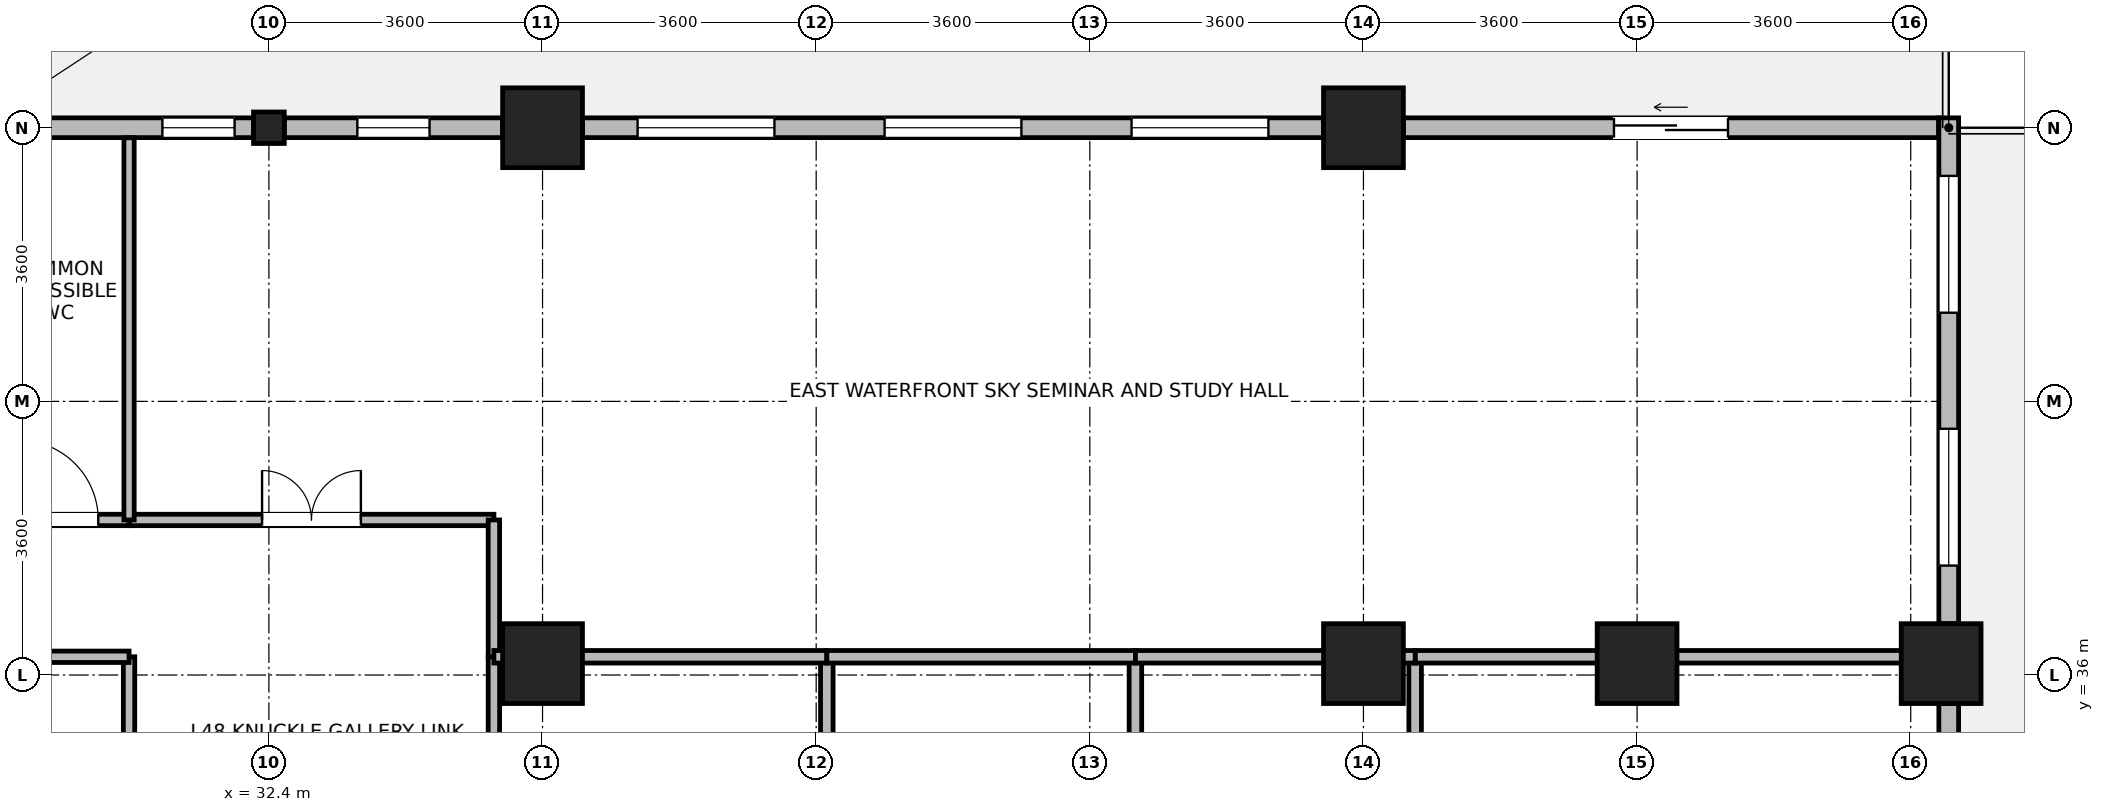
"""IFC4 building model, lengths in metres.
Left out: names, types, materials, properties, quantities, classifications, styles, units other than length and angle.
Written with IfcOpenShell. Run it as: python <this file> out.ifc"""

import sys

from ifc_helpers import new_model, si_unit, direction, frame, frame_2d, origin, origin_2d, place, context, subcontext, project, spatial, rectangle, i_section, extrude, source, transform, mapped, element, fill, save


model = new_model("IFC4")
c1 = context("Model", 3, precision=1e-05, world=origin(), true_north=direction((0.0, 1.0)))
c2 = subcontext(c1, "Body", "Model", "MODEL_VIEW")
j1 = project(units=[si_unit("LENGTHUNIT", "METRE"), si_unit("PLANEANGLEUNIT", "RADIAN")], contexts=[c1])
p1 = place(None, origin())
s1 = spatial("IfcSite", under=j1, at=p1, CompositionType="ELEMENT")
p2 = place(p1, origin())
s2 = spatial("IfcBuilding", under=s1, at=p2, CompositionType="ELEMENT")
p3 = place(p2, frame((0.0, 0.0, 188.3)))
s3 = spatial("IfcBuildingStorey", under=s2, at=p3, CompositionType="ELEMENT", Elevation=188.3)
m1 = source(origin(), c2, "Body", "SweptSolid", [
    extrude(rectangle(XDim=1.05, YDim=1.05, at=origin_2d()), origin(), (0.0, 0.0, 1.0), 3.7),
])
for number, where, z_axis, x_axis in (
    (1, (36.0, 43.2, 0.0), (0.0, 0.0, 1.0), (1.0, 0.0, 0.0)),
    (2, (36.0, 36.15, 0.0), (0.0, 0.0, 1.0), (1.0, 0.0, 0.0)),
    (3, (46.8, 36.15, 0.0), (0.0, 0.0, 1.0), (1.0, 0.0, 0.0)),
    (4, (46.8, 43.2, 0.0), (0.0, 0.0, 1.0), (1.0, 0.0, 0.0)),
    (5, (50.4, 36.15, 0.0), (0.0, 0.0, 1.0), (1.0, 0.0, 0.0)),
    (6, (54.4, 36.15, 0.0), (0.0, 0.0, 1.0), (1.0, 0.0, 0.0)),
):
    element("IfcColumn", number, at=place(p3, frame(where, z_axis=z_axis, x_axis=x_axis)), inside=s3, PredefinedType="COLUMN", context=c2, shape_type="MappedRepresentation", body=[
        mapped(m1, transform((0.0, 0.0, 0.0), x_axis=(1.0, 0.0, 0.0), y_axis=(0.0, 1.0, 0.0), z_axis=(0.0, 0.0, 1.0), scale=1.0)),
    ])
m2 = source(origin(), c2, "Body", "SweptSolid", [
    extrude(i_section(OverallWidth=0.404, OverallDepth=0.414, WebThickness=0.021, FlangeThickness=0.028, FilletRadius=0.015, at=origin_2d()), origin(), (0.0, 0.0, 1.0), 3.7),
])
p4 = place(p3, frame((32.4, 43.2, 0.0), z_axis=(0.0, 0.0, 1.0), x_axis=(1.0, 0.0, 0.0)))
e7 = element("IfcColumn", 7, at=p4, inside=s3, PredefinedType="COLUMN", context=c2, shape_type="MappedRepresentation", body=[
    mapped(m2, transform((0.0, 0.0, 0.0), x_axis=(1.0, 0.0, 0.0), y_axis=(0.0, 1.0, 0.0), z_axis=(0.0, 0.0, 1.0), scale=1.0)),
])
p5 = place(p3, frame((54.5, 35.624, 0.0), z_axis=(0.0, 0.0, 1.0), x_axis=(0.0, -1.0, 0.0)))
e8 = element("IfcWall", 8, at=p5, inside=s3, PredefinedType="STANDARD", context=c2, shape_type="SweptSolid", body=[
    extrude(rectangle(XDim=6.448, YDim=0.26, at=frame_2d((3.224, 0.0))), origin(), (0.0, 0.0, 1.0), 2.87),
])
p6 = place(p5, frame((0.712, 0.0, 0.85)))
e9 = element("IfcOpeningElement", 9, at=p6, cuts=e8, PredefinedType="OPENING", context=c2, shape_type="SweptSolid", body=[
    extrude(rectangle(XDim=1.8, YDim=1.85, at=frame_2d((0.9, 0.925))), frame((0.0, 0.14, 0.0), z_axis=(0.0, -1.0, 0.0), x_axis=(1.0, 0.0, 0.0)), (0.0, 0.0, 1.0), 0.28),
])
p7 = place(p5, frame((3.936, 0.0, 0.85)))
e10 = element("IfcOpeningElement", 10, at=p7, cuts=e8, PredefinedType="OPENING", context=c2, shape_type="SweptSolid", body=[
    extrude(rectangle(XDim=1.8, YDim=1.85, at=frame_2d((0.9, 0.925))), frame((0.0, 0.14, 0.0), z_axis=(0.0, -1.0, 0.0), x_axis=(1.0, 0.0, 0.0)), (0.0, 0.0, 1.0), 0.28),
])
p8 = place(p3, frame((54.5, 43.33, 0.0), z_axis=(0.0, 0.0, 1.0), x_axis=(0.0, -1.0, 0.0)))
e11 = element("IfcWall", 11, at=p8, inside=s3, PredefinedType="STANDARD", context=c2, shape_type="SweptSolid", body=[
    extrude(rectangle(XDim=6.654, YDim=0.26, at=frame_2d((3.327, 0.0))), origin(), (0.0, 0.0, 1.0), 3.32),
])
p9 = place(p8, frame((0.763, 0.0, 0.85)))
e12 = element("IfcOpeningElement", 12, at=p9, cuts=e11, PredefinedType="OPENING", context=c2, shape_type="SweptSolid", body=[
    extrude(rectangle(XDim=1.8, YDim=1.85, at=frame_2d((0.9, 0.925))), frame((0.0, 0.14, 0.0), z_axis=(0.0, -1.0, 0.0), x_axis=(1.0, 0.0, 0.0)), (0.0, 0.0, 1.0), 0.28),
])
p10 = place(p8, frame((4.091, 0.0, 0.85)))
e13 = element("IfcOpeningElement", 13, at=p10, cuts=e11, PredefinedType="OPENING", context=c2, shape_type="SweptSolid", body=[
    extrude(rectangle(XDim=1.8, YDim=1.85, at=frame_2d((0.9, 0.925))), frame((0.0, 0.14, 0.0), z_axis=(0.0, -1.0, 0.0), x_axis=(1.0, 0.0, 0.0)), (0.0, 0.0, 1.0), 0.28),
])
p11 = place(p3, frame((47.326, 43.2, 0.0), z_axis=(0.0, 0.0, 1.0), x_axis=(1.0, 0.0, 0.0)))
e14 = element("IfcWall", 14, at=p11, inside=s3, PredefinedType="STANDARD", context=c2, shape_type="SweptSolid", body=[
    extrude(rectangle(XDim=7.039, YDim=0.26, at=frame_2d((3.52, 0.0))), origin(), (0.0, 0.0, 1.0), 3.32),
])
p12 = place(p11, frame((2.77, 0.0, 0.0)))
e15 = element("IfcOpeningElement", 15, at=p12, cuts=e14, PredefinedType="OPENING", context=c2, shape_type="SweptSolid", body=[
    extrude(rectangle(XDim=1.5, YDim=2.15, at=frame_2d((0.75, 1.075))), frame((0.0, 0.14, 0.0), z_axis=(0.0, -1.0, 0.0), x_axis=(1.0, 0.0, 0.0)), (0.0, 0.0, 1.0), 0.28),
])
p13 = place(p3, frame((36.526, 43.2, 0.0), z_axis=(0.0, 0.0, 1.0), x_axis=(1.0, 0.0, 0.0)))
e16 = element("IfcWall", 16, at=p13, inside=s3, PredefinedType="STANDARD", context=c2, shape_type="SweptSolid", body=[
    extrude(rectangle(XDim=9.748, YDim=0.26, at=frame_2d((4.874, 0.0))), origin(), (0.0, 0.0, 1.0), 2.87),
])
p14 = place(p13, frame((0.725, 0.0, 0.85)))
e17 = element("IfcOpeningElement", 17, at=p14, cuts=e16, PredefinedType="OPENING", context=c2, shape_type="SweptSolid", body=[
    extrude(rectangle(XDim=1.8, YDim=1.85, at=frame_2d((0.9, 0.925))), frame((0.0, 0.14, 0.0), z_axis=(0.0, -1.0, 0.0), x_axis=(1.0, 0.0, 0.0)), (0.0, 0.0, 1.0), 0.28),
])
p15 = place(p13, frame((3.974, 0.0, 0.85)))
e18 = element("IfcOpeningElement", 18, at=p15, cuts=e16, PredefinedType="OPENING", context=c2, shape_type="SweptSolid", body=[
    extrude(rectangle(XDim=1.8, YDim=1.85, at=frame_2d((0.9, 0.925))), frame((0.0, 0.14, 0.0), z_axis=(0.0, -1.0, 0.0), x_axis=(1.0, 0.0, 0.0)), (0.0, 0.0, 1.0), 0.28),
])
p16 = place(p13, frame((7.223, 0.0, 0.85)))
e19 = element("IfcOpeningElement", 19, at=p16, cuts=e16, PredefinedType="OPENING", context=c2, shape_type="SweptSolid", body=[
    extrude(rectangle(XDim=1.8, YDim=1.85, at=frame_2d((0.9, 0.925))), frame((0.0, 0.14, 0.0), z_axis=(0.0, -1.0, 0.0), x_axis=(1.0, 0.0, 0.0)), (0.0, 0.0, 1.0), 0.28),
])
p17 = place(p3, frame((32.603, 43.2, 0.0), z_axis=(0.0, 0.0, 1.0), x_axis=(1.0, 0.0, 0.0)))
e20 = element("IfcWall", 20, at=p17, inside=s3, PredefinedType="STANDARD", context=c2, shape_type="SweptSolid", body=[
    extrude(rectangle(XDim=2.871, YDim=0.26, at=frame_2d((1.436, 0.0))), origin(), (0.0, 0.0, 1.0), 2.87),
])
p18 = place(p17, frame((0.96, 0.0, 0.85)))
e21 = element("IfcOpeningElement", 21, at=p18, cuts=e20, PredefinedType="OPENING", context=c2, shape_type="SweptSolid", body=[
    extrude(rectangle(XDim=0.95, YDim=1.75, at=frame_2d((0.475, 0.875))), frame((0.0, 0.14, 0.0), z_axis=(0.0, -1.0, 0.0), x_axis=(1.0, 0.0, 0.0)), (0.0, 0.0, 1.0), 0.28),
])
p19 = place(p3, frame((29.326, 43.2, 0.0), z_axis=(0.0, 0.0, 1.0), x_axis=(1.0, 0.0, 0.0)))
e22 = element("IfcWall", 22, at=p19, inside=s3, PredefinedType="STANDARD", context=c2, shape_type="SweptSolid", body=[
    extrude(rectangle(XDim=2.871, YDim=0.26, at=frame_2d((1.436, 0.0))), origin(), (0.0, 0.0, 1.0), 2.87),
])
p20 = place(p19, frame((1.673, 0.0, 0.85)))
e23 = element("IfcOpeningElement", 23, at=p20, cuts=e22, PredefinedType="OPENING", context=c2, shape_type="SweptSolid", body=[
    extrude(rectangle(XDim=0.95, YDim=1.75, at=frame_2d((0.475, 0.875))), frame((0.0, 0.14, 0.0), z_axis=(0.0, -1.0, 0.0), x_axis=(1.0, 0.0, 0.0)), (0.0, 0.0, 1.0), 0.28),
])
p21 = place(p3, frame((35.36, 28.56, 0.0), z_axis=(0.0, 0.0, 1.0), x_axis=(0.0, 1.0, 0.0)))
e24 = element("IfcWall", 24, at=p21, inside=s3, PredefinedType="PARTITIONING", context=c2, shape_type="SweptSolid", body=[
    extrude(rectangle(XDim=7.68, YDim=0.15, at=frame_2d((3.84, 0.0))), origin(), (0.0, 0.0, 1.0), 3.32),
])
p22 = place(p21, frame((3.19, 0.0, 0.0)))
e25 = element("IfcOpeningElement", 25, at=p22, cuts=e24, PredefinedType="OPENING", context=c2, shape_type="SweptSolid", body=[
    extrude(rectangle(XDim=1.3, YDim=2.12, at=frame_2d((0.65, 1.06))), frame((0.0, 0.085, 0.0), z_axis=(0.0, -1.0, 0.0), x_axis=(1.0, 0.0, 0.0)), (0.0, 0.0, 1.0), 0.17),
])
p23 = place(p3, frame((30.56, 38.04, 0.0), z_axis=(0.0, 0.0, 1.0), x_axis=(1.0, 0.0, 0.0)))
e26 = element("IfcWall", 26, at=p23, inside=s3, PredefinedType="PARTITIONING", context=c2, shape_type="SweptSolid", body=[
    extrude(rectangle(XDim=4.8, YDim=0.15, at=frame_2d((2.4, 0.0))), origin(), (0.0, 0.0, 1.0), 3.32),
])
p24 = place(p23, frame((1.75, 0.0, 0.0)))
e27 = element("IfcOpeningElement", 27, at=p24, cuts=e26, PredefinedType="OPENING", context=c2, shape_type="SweptSolid", body=[
    extrude(rectangle(XDim=1.3, YDim=2.12, at=frame_2d((0.65, 1.06))), frame((0.0, 0.085, 0.0), z_axis=(0.0, -1.0, 0.0), x_axis=(1.0, 0.0, 0.0)), (0.0, 0.0, 1.0), 0.17),
])
p25 = place(p3, frame((30.56, 31.64, 0.0), z_axis=(0.0, 0.0, 1.0), x_axis=(0.0, 1.0, 0.0)))
e28 = element("IfcWall", 28, at=p25, inside=s3, PredefinedType="PARTITIONING", context=c2, shape_type="SweptSolid", body=[
    extrude(rectangle(XDim=4.6, YDim=0.15, at=frame_2d((2.3, 0.0))), origin(), (0.0, 0.0, 1.0), 3.32),
])
p26 = place(p25, frame((1.65, 0.0, 0.0)))
e29 = element("IfcOpeningElement", 29, at=p26, cuts=e28, PredefinedType="OPENING", context=c2, shape_type="SweptSolid", body=[
    extrude(rectangle(XDim=1.3, YDim=2.12, at=frame_2d((0.65, 1.06))), frame((0.0, 0.085, 0.0), z_axis=(0.0, -1.0, 0.0), x_axis=(1.0, 0.0, 0.0)), (0.0, 0.0, 1.0), 0.17),
])
p27 = place(p3, frame((28.7, 38.04, 0.0), z_axis=(0.0, 0.0, 1.0), x_axis=(1.0, 0.0, 0.0)))
e30 = element("IfcWall", 30, at=p27, inside=s3, PredefinedType="PARTITIONING", context=c2, shape_type="SweptSolid", body=[
    extrude(rectangle(XDim=1.86, YDim=0.15, at=frame_2d((0.93, 0.0))), origin(), (0.0, 0.0, 1.0), 3.32),
])
p28 = place(p27, frame((0.405, 0.0, 0.0)))
e31 = element("IfcOpeningElement", 31, at=p28, cuts=e30, PredefinedType="OPENING", context=c2, shape_type="SweptSolid", body=[
    extrude(rectangle(XDim=1.05, YDim=2.12, at=frame_2d((0.525, 1.06))), frame((0.0, 0.085, 0.0), z_axis=(0.0, -1.0, 0.0), x_axis=(1.0, 0.0, 0.0)), (0.0, 0.0, 1.0), 0.17),
])
p29 = place(p3, frame((35.36, 36.24, 0.0), z_axis=(0.0, 0.0, 1.0), x_axis=(0.0, 1.0, 0.0)))
e32 = element("IfcWall", 32, at=p29, inside=s3, PredefinedType="PARTITIONING", context=c2, shape_type="SweptSolid", body=[
    extrude(rectangle(XDim=1.8, YDim=0.15, at=frame_2d((0.9, 0.0))), origin(), (0.0, 0.0, 1.0), 3.32),
])
p30 = place(p3, frame((29.325, 36.24, 0.0), z_axis=(0.0, 0.0, 1.0), x_axis=(1.0, 0.0, 0.0)))
e33 = element("IfcWall", 33, at=p30, inside=s3, PredefinedType="PARTITIONING", context=c2, shape_type="SweptSolid", body=[
    extrude(rectangle(XDim=1.235, YDim=0.15, at=frame_2d((0.618, 0.0))), origin(), (0.0, 0.0, 1.0), 2.72),
])
for number, where, z_axis, x_axis in (
    (34, (39.74, 28.56, 0.0), (0.0, 0.0, 1.0), (0.0, 1.0, 0.0)),
    (35, (43.8, 28.56, 0.0), (0.0, 0.0, 1.0), (0.0, 1.0, 0.0)),
    (36, (47.48, 28.56, 0.0), (0.0, 0.0, 1.0), (0.0, 1.0, 0.0)),
):
    element("IfcWall", number, at=place(p3, frame(where, z_axis=z_axis, x_axis=x_axis)), inside=s3, PredefinedType="PARTITIONING", context=c2, shape_type="SweptSolid", body=[
        extrude(rectangle(XDim=7.68, YDim=0.165, at=frame_2d((3.84, 0.0))), origin(), (0.0, 0.0, 1.0), 3.32),
    ])
p31 = place(p3, frame((47.48, 36.24, 0.0), z_axis=(0.0, 0.0, 1.0), x_axis=(1.0, 0.0, 0.0)))
e37 = element("IfcWall", 37, at=p31, inside=s3, PredefinedType="PARTITIONING", context=c2, shape_type="SweptSolid", body=[
    extrude(rectangle(XDim=6.888, YDim=0.165, at=frame_2d((3.444, 0.0))), origin(), (0.0, 0.0, 1.0), 2.72),
])
p32 = place(p3, frame((30.56, 38.04, 0.0), z_axis=(0.0, 0.0, 1.0), x_axis=(0.0, 1.0, 0.0)))
e38 = element("IfcWall", 38, at=p32, inside=s3, PredefinedType="PARTITIONING", context=c2, shape_type="SweptSolid", body=[
    extrude(rectangle(XDim=5.028, YDim=0.135, at=frame_2d((2.514, 0.0))), origin(), (0.0, 0.0, 1.0), 3.32),
])
p33 = place(p3, frame((35.36, 36.24, 0.0), z_axis=(0.0, 0.0, 1.0), x_axis=(1.0, 0.0, 0.0)))
e39 = element("IfcWall", 39, at=p33, inside=s3, PredefinedType="PARTITIONING", context=c2, shape_type="SweptSolid", body=[
    extrude(rectangle(XDim=4.38, YDim=0.165, at=frame_2d((2.19, 0.0))), origin(), (0.0, 0.0, 1.0), 2.72),
])
p34 = place(p3, frame((39.74, 36.24, 0.0), z_axis=(0.0, 0.0, 1.0), x_axis=(1.0, 0.0, 0.0)))
e40 = element("IfcWall", 40, at=p34, inside=s3, PredefinedType="PARTITIONING", context=c2, shape_type="SweptSolid", body=[
    extrude(rectangle(XDim=4.06, YDim=0.165, at=frame_2d((2.03, 0.0))), origin(), (0.0, 0.0, 1.0), 2.72),
])
p35 = place(p3, frame((43.8, 36.24, 0.0), z_axis=(0.0, 0.0, 1.0), x_axis=(1.0, 0.0, 0.0)))
e41 = element("IfcWall", 41, at=p35, inside=s3, PredefinedType="PARTITIONING", context=c2, shape_type="SweptSolid", body=[
    extrude(rectangle(XDim=3.68, YDim=0.165, at=frame_2d((1.84, 0.0))), origin(), (0.0, 0.0, 1.0), 2.72),
])
p36 = place(p9, origin())
e42 = element("IfcWindow", 42, at=p36, inside=s3, PartitioningType="SINGLE_PANEL", PredefinedType="WINDOW", context=c2, shape_type="SweptSolid", body=[
    extrude(rectangle(XDim=1.8, YDim=1.85, at=frame_2d((0.9, 0.925))), frame((0.0, 0.03, 0.0), z_axis=(0.0, -1.0, 0.0), x_axis=(1.0, 0.0, 0.0)), (0.0, 0.0, 1.0), 0.06),
])
fill(e12, e42)
p37 = place(p10, origin())
e43 = element("IfcWindow", 43, at=p37, inside=s3, PartitioningType="SINGLE_PANEL", PredefinedType="WINDOW", context=c2, shape_type="SweptSolid", body=[
    extrude(rectangle(XDim=1.8, YDim=1.85, at=frame_2d((0.9, 0.925))), frame((0.0, 0.03, 0.0), z_axis=(0.0, -1.0, 0.0), x_axis=(1.0, 0.0, 0.0)), (0.0, 0.0, 1.0), 0.06),
])
fill(e13, e43)
p38 = place(p12, origin())
e44 = element("IfcDoor", 44, at=p38, inside=s3, OperationType="SLIDING_TO_LEFT", PredefinedType="DOOR", context=c2, shape_type="SweptSolid", body=[
    extrude(rectangle(XDim=1.5, YDim=2.15, at=frame_2d((0.75, 1.075))), frame((0.0, 0.025, 0.0), z_axis=(0.0, -1.0, 0.0), x_axis=(1.0, 0.0, 0.0)), (0.0, 0.0, 1.0), 0.05),
])
fill(e15, e44)
p39 = place(p14, origin())
e45 = element("IfcWindow", 45, at=p39, inside=s3, PartitioningType="SINGLE_PANEL", PredefinedType="WINDOW", context=c2, shape_type="SweptSolid", body=[
    extrude(rectangle(XDim=1.8, YDim=1.85, at=frame_2d((0.9, 0.925))), frame((0.0, 0.03, 0.0), z_axis=(0.0, -1.0, 0.0), x_axis=(1.0, 0.0, 0.0)), (0.0, 0.0, 1.0), 0.06),
])
fill(e17, e45)
p40 = place(p15, origin())
e46 = element("IfcWindow", 46, at=p40, inside=s3, PartitioningType="SINGLE_PANEL", PredefinedType="WINDOW", context=c2, shape_type="SweptSolid", body=[
    extrude(rectangle(XDim=1.8, YDim=1.85, at=frame_2d((0.9, 0.925))), frame((0.0, 0.03, 0.0), z_axis=(0.0, -1.0, 0.0), x_axis=(1.0, 0.0, 0.0)), (0.0, 0.0, 1.0), 0.06),
])
fill(e18, e46)
p41 = place(p16, origin())
e47 = element("IfcWindow", 47, at=p41, inside=s3, PartitioningType="SINGLE_PANEL", PredefinedType="WINDOW", context=c2, shape_type="SweptSolid", body=[
    extrude(rectangle(XDim=1.8, YDim=1.85, at=frame_2d((0.9, 0.925))), frame((0.0, 0.03, 0.0), z_axis=(0.0, -1.0, 0.0), x_axis=(1.0, 0.0, 0.0)), (0.0, 0.0, 1.0), 0.06),
])
fill(e19, e47)
p42 = place(p18, origin())
e48 = element("IfcWindow", 48, at=p42, inside=s3, PartitioningType="SINGLE_PANEL", PredefinedType="WINDOW", context=c2, shape_type="SweptSolid", body=[
    extrude(rectangle(XDim=0.95, YDim=1.75, at=frame_2d((0.475, 0.875))), frame((0.0, 0.03, 0.0), z_axis=(0.0, -1.0, 0.0), x_axis=(1.0, 0.0, 0.0)), (0.0, 0.0, 1.0), 0.06),
])
fill(e21, e48)
p43 = place(p20, origin())
e49 = element("IfcWindow", 49, at=p43, inside=s3, PartitioningType="SINGLE_PANEL", PredefinedType="WINDOW", context=c2, shape_type="SweptSolid", body=[
    extrude(rectangle(XDim=0.95, YDim=1.75, at=frame_2d((0.475, 0.875))), frame((0.0, 0.03, 0.0), z_axis=(0.0, -1.0, 0.0), x_axis=(1.0, 0.0, 0.0)), (0.0, 0.0, 1.0), 0.06),
])
fill(e23, e49)
p44 = place(p24, origin())
e50 = element("IfcDoor", 50, at=p44, inside=s3, OperationType="DOUBLE_DOOR_SINGLE_SWING", PredefinedType="DOOR", context=c2, shape_type="SweptSolid", body=[
    extrude(rectangle(XDim=1.3, YDim=2.12, at=frame_2d((0.65, 1.06))), frame((0.0, 0.025, 0.0), z_axis=(0.0, -1.0, 0.0), x_axis=(1.0, 0.0, 0.0)), (0.0, 0.0, 1.0), 0.05),
])
fill(e27, e50)
p45 = place(p28, origin())
e51 = element("IfcDoor", 51, at=p45, inside=s3, OperationType="SINGLE_SWING_LEFT", PredefinedType="DOOR", context=c2, shape_type="SweptSolid", body=[
    extrude(rectangle(XDim=1.05, YDim=2.12, at=frame_2d((0.525, 1.06))), frame((0.0, 0.025, 0.0), z_axis=(0.0, -1.0, 0.0), x_axis=(1.0, 0.0, 0.0)), (0.0, 0.0, 1.0), 0.05),
])
fill(e31, e51)
save(model, sys.argv[1])
